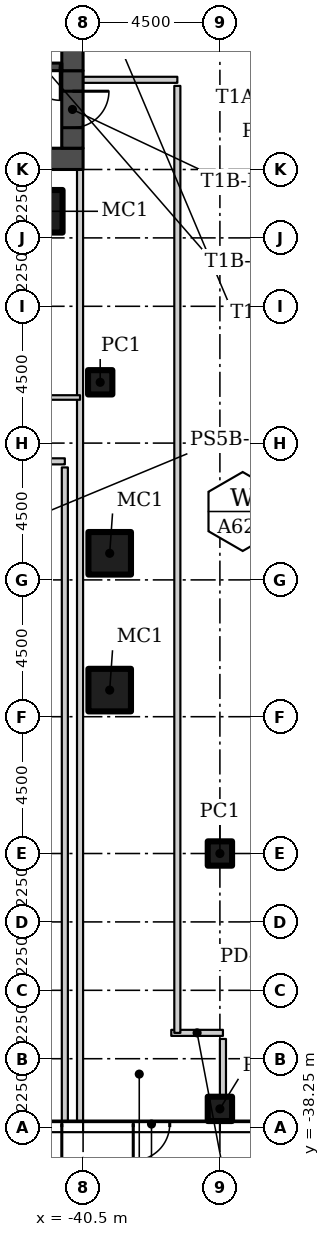
"""IFC4 building model, lengths in metres.
Left out: names, types, materials, properties, quantities, classifications, styles, units other than length and angle.
Written with IfcOpenShell. Run it as: python <this file> out.ifc"""

import sys

from ifc_helpers import new_model, si_unit, direction, frame, frame_2d, origin, origin_2d, place, context, subcontext, project, spatial, rectangle, hollow_rectangle, extrude, element, fill, save


model = new_model("IFC4")
c1 = context("Model", 3, precision=1e-05, world=origin(), true_north=direction((0.0, 1.0)))
c2 = subcontext(c1, "Body", "Model", "MODEL_VIEW")
j1 = project(units=[si_unit("LENGTHUNIT", "METRE"), si_unit("PLANEANGLEUNIT", "RADIAN")], contexts=[c1])
p1 = place(None, origin())
s1 = spatial("IfcSite", under=j1, at=p1, CompositionType="ELEMENT")
p2 = place(p1, origin())
s2 = spatial("IfcBuilding", under=s1, at=p2, CompositionType="ELEMENT")
p3 = place(p2, origin())
s3 = spatial("IfcBuildingStorey", under=s2, at=p3, CompositionType="ELEMENT", Elevation=0.0)
p4 = place(p3, frame((-41.875, -8.125, 0.0)))
e1 = element("IfcColumn", 1, at=p4, inside=s3, PredefinedType="COLUMN", context=c2, shape_type="SweptSolid", body=[
    extrude(hollow_rectangle(XDim=1.4, YDim=1.4, WallThickness=0.06, at=origin_2d()), origin(), (0.0, 0.0, 1.0), 6.1),
])
p5 = place(p3, frame((-39.938, -13.75, 0.0)))
e2 = element("IfcColumn", 2, at=p5, inside=s3, PredefinedType="COLUMN", context=c2, shape_type="SweptSolid", body=[
    extrude(hollow_rectangle(XDim=0.8, YDim=0.8, WallThickness=0.03, at=origin_2d()), origin(), (0.0, 0.0, 1.0), 6.1),
])
for number, where in (
    (3, (-39.625, -19.375, 0.0)),
    (4, (-39.625, -23.875, 0.0)),
):
    element("IfcColumn", number, at=place(p3, frame(where)), inside=s3, PredefinedType="COLUMN", context=c2, shape_type="SweptSolid", body=[
        extrude(hollow_rectangle(XDim=1.4, YDim=1.4, WallThickness=0.06, at=origin_2d()), origin(), (0.0, 0.0, 1.0), 6.1),
    ])
for number, where in (
    (5, (-36.0, -37.65, 0.0)),
    (6, (-36.0, -29.25, 0.0)),
):
    element("IfcColumn", number, at=place(p3, frame(where)), inside=s3, PredefinedType="COLUMN", context=c2, shape_type="SweptSolid", body=[
        extrude(hollow_rectangle(XDim=0.8, YDim=0.8, WallThickness=0.03, at=origin_2d()), origin(), (0.0, 0.0, 1.0), 6.1),
    ])
p6 = place(p3, frame((-35.9, -35.15, 0.0), z_axis=(0.0, 0.0, 1.0), x_axis=(-1.0, 0.0, 0.0)))
e7 = element("IfcWall", 7, at=p6, inside=s3, PredefinedType="PARTITIONING", context=c2, shape_type="SweptSolid", body=[
    extrude(rectangle(XDim=1.7, YDim=0.2, at=frame_2d((0.85, 0.0))), origin(), (0.0, 0.0, 1.0), 6.1),
])
p7 = place(p3, frame((-37.4, -3.8, 0.0), z_axis=(0.0, 0.0, 1.0), x_axis=(-1.0, 0.0, 0.0)))
e8 = element("IfcWall", 8, at=p7, inside=s3, PredefinedType="PARTITIONING", context=c2, shape_type="SweptSolid", body=[
    extrude(rectangle(XDim=3.1, YDim=0.2, at=frame_2d((1.55, 0.0))), origin(), (0.0, 0.0, 1.0), 6.1),
])
p8 = place(p3, frame((-37.4, -35.15, 0.0), z_axis=(0.0, 0.0, 1.0), x_axis=(0.0, 1.0, 0.0)))
e9 = element("IfcWall", 9, at=p8, inside=s3, PredefinedType="PARTITIONING", context=c2, shape_type="SweptSolid", body=[
    extrude(rectangle(XDim=31.149, YDim=0.2, at=frame_2d((15.575, 0.0))), origin(), (0.0, 0.0, 1.0), 6.1),
])
p9 = place(p3, frame((-35.9, -38.155, 0.0), z_axis=(0.0, 0.0, 1.0), x_axis=(0.0, 1.0, 0.0)))
e10 = element("IfcWall", 10, at=p9, inside=s3, PredefinedType="PARTITIONING", context=c2, shape_type="SweptSolid", body=[
    extrude(rectangle(XDim=2.805, YDim=0.2, at=frame_2d((1.402, 0.0))), origin(), (0.0, 0.0, 1.0), 6.1),
])
p10 = place(p3, frame((-40.6, -6.75, 0.0), z_axis=(0.0, 0.0, 1.0), x_axis=(0.0, -1.0, 0.0)))
e11 = element("IfcWall", 11, at=p10, inside=s3, PredefinedType="PARTITIONING", context=c2, shape_type="SweptSolid", body=[
    extrude(rectangle(XDim=31.405, YDim=0.2, at=frame_2d((15.703, 0.0))), origin(), (0.0, 0.0, 1.0), 6.1),
])
p11 = place(p3, frame((-41.1, -38.155, 0.0), z_axis=(0.0, 0.0, 1.0), x_axis=(0.0, 1.0, 0.0)))
e12 = element("IfcWall", 12, at=p11, inside=s3, PredefinedType="PARTITIONING", context=c2, shape_type="SweptSolid", body=[
    extrude(rectangle(XDim=21.605, YDim=0.2, at=frame_2d((10.802, 0.0))), origin(), (0.0, 0.0, 1.0), 6.1),
])
p12 = place(p3, frame((-41.1, -16.35, 0.0), z_axis=(0.0, 0.0, 1.0), x_axis=(-1.0, 0.0, 0.0)))
e13 = element("IfcWall", 13, at=p12, inside=s3, PredefinedType="PARTITIONING", context=c2, shape_type="SweptSolid", body=[
    extrude(rectangle(XDim=3.5, YDim=0.2, at=frame_2d((1.75, 0.0))), origin(), (0.0, 0.0, 1.0), 6.1),
])
p13 = place(p3, frame((-40.6, -14.25, 0.0), z_axis=(0.0, 0.0, 1.0), x_axis=(-1.0, 0.0, 0.0)))
e14 = element("IfcWall", 14, at=p13, inside=s3, PredefinedType="PARTITIONING", context=c2, shape_type="SweptSolid", body=[
    extrude(rectangle(XDim=13.325, YDim=0.15, at=frame_2d((6.663, 0.0))), origin(), (0.0, 0.0, 1.0), 6.1),
])
p14 = place(p3, frame((-35.993, -38.15, 0.0), z_axis=(0.0, 0.0, 1.0), x_axis=(-1.0, 0.0, 0.0)))
e15 = element("IfcWall", 15, at=p14, inside=s3, PredefinedType="SOLIDWALL", context=c2, shape_type="SweptSolid", body=[
    extrude(rectangle(XDim=4.514, YDim=0.2, at=frame_2d((2.257, 0.0))), origin(), (0.0, 0.0, 1.0), 3.0),
])
p15 = place(p14, frame((1.657, 0.0, 0.0)))
e16 = element("IfcOpeningElement", 16, at=p15, cuts=e15, PredefinedType="OPENING", context=c2, shape_type="SweptSolid", body=[
    extrude(rectangle(XDim=1.2, YDim=2.4, at=frame_2d((0.6, 1.2))), frame((0.0, 0.11, 0.0), z_axis=(0.0, -1.0, 0.0), x_axis=(1.0, 0.0, 0.0)), (0.0, 0.0, 1.0), 0.22),
])
p16 = place(p3, frame((-31.533, -38.15, 0.0), z_axis=(0.0, 0.0, 1.0), x_axis=(-1.0, 0.0, 0.0)))
e17 = element("IfcWall", 17, at=p16, inside=s3, PredefinedType="SOLIDWALL", context=c2, shape_type="SweptSolid", body=[
    extrude(rectangle(XDim=4.434, YDim=0.2, at=frame_2d((2.217, 0.0))), origin(), (0.0, 0.0, 1.0), 3.0),
])
p17 = place(p16, frame((1.217, 0.0, 0.0)))
e18 = element("IfcOpeningElement", 18, at=p17, cuts=e17, PredefinedType="OPENING", context=c2, shape_type="SweptSolid", body=[
    extrude(rectangle(XDim=2.0, YDim=2.4, at=frame_2d((1.0, 1.2))), frame((0.0, 0.11, 0.0), z_axis=(0.0, -1.0, 0.0), x_axis=(1.0, 0.0, 0.0)), (0.0, 0.0, 1.0), 0.22),
])
p18 = place(p3, frame((-40.533, -38.15, 0.0), z_axis=(0.0, 0.0, 1.0), x_axis=(-1.0, 0.0, 0.0)))
e19 = element("IfcWall", 19, at=p18, inside=s3, PredefinedType="SOLIDWALL", context=c2, shape_type="SweptSolid", body=[
    extrude(rectangle(XDim=4.427, YDim=0.2, at=frame_2d((2.213, 0.0))), origin(), (0.0, 0.0, 1.0), 3.0),
])
p19 = place(p18, frame((0.667, 0.0, 0.0)))
e20 = element("IfcOpeningElement", 20, at=p19, cuts=e19, PredefinedType="OPENING", context=c2, shape_type="SweptSolid", body=[
    extrude(rectangle(XDim=3.3, YDim=2.4, at=frame_2d((1.65, 1.2))), frame((0.0, 0.11, 0.0), z_axis=(0.0, -1.0, 0.0), x_axis=(1.0, 0.0, 0.0)), (0.0, 0.0, 1.0), 0.22),
])
p20 = place(p3, frame((-40.5, -6.4, 0.0), z_axis=(0.0, 0.0, 1.0), x_axis=(-1.0, 0.0, 0.0)))
e21 = element("IfcWall", 21, at=p20, inside=s3, PredefinedType="SHEAR", context=c2, shape_type="SweptSolid", body=[
    extrude(rectangle(XDim=13.5, YDim=0.7, at=frame_2d((6.75, 0.0))), origin(), (0.0, 0.0, 1.0), 6.1),
])
p21 = place(p3, frame((-40.85, -3.5, 0.0), z_axis=(0.0, 0.0, 1.0), x_axis=(0.0, -1.0, 0.0)))
e22 = element("IfcWall", 22, at=p21, inside=s3, PredefinedType="SHEAR", context=c2, shape_type="SweptSolid", body=[
    extrude(rectangle(XDim=2.55, YDim=0.7, at=frame_2d((1.275, 0.0))), origin(), (0.0, 0.0, 1.0), 6.1),
])
p22 = place(p21, frame((0.675, 0.0, 0.0)))
e23 = element("IfcOpeningElement", 23, at=p22, cuts=e22, PredefinedType="OPENING", context=c2, shape_type="SweptSolid", body=[
    extrude(rectangle(XDim=1.2, YDim=2.4, at=frame_2d((0.6, 1.2))), frame((0.0, 0.36, 0.0), z_axis=(0.0, -1.0, 0.0), x_axis=(1.0, 0.0, 0.0)), (0.0, 0.0, 1.0), 0.72),
])
p23 = place(p3, frame((-40.85, -3.5, 0.0), z_axis=(0.0, 0.0, 1.0), x_axis=(0.0, 1.0, 0.0)))
e24 = element("IfcWall", 24, at=p23, inside=s3, PredefinedType="SHEAR", context=c2, shape_type="SweptSolid", body=[
    extrude(rectangle(XDim=7.0, YDim=0.7, at=frame_2d((3.5, 0.0))), origin(), (0.0, 0.0, 1.0), 6.1),
])
p24 = place(p23, frame((0.9, 0.0, 0.0)))
e25 = element("IfcOpeningElement", 25, at=p24, cuts=e24, PredefinedType="OPENING", context=c2, shape_type="SweptSolid", body=[
    extrude(rectangle(XDim=1.2, YDim=2.1, at=frame_2d((0.6, 1.05))), frame((0.0, 0.36, 0.0), z_axis=(0.0, -1.0, 0.0), x_axis=(1.0, 0.0, 0.0)), (0.0, 0.0, 1.0), 0.72),
])
p25 = place(p23, frame((3.85, 0.0, 0.0)))
e26 = element("IfcOpeningElement", 26, at=p25, cuts=e24, PredefinedType="OPENING", context=c2, shape_type="SweptSolid", body=[
    extrude(rectangle(XDim=1.8, YDim=2.4, at=frame_2d((0.9, 1.2))), frame((0.0, 0.36, 0.0), z_axis=(0.0, -1.0, 0.0), x_axis=(1.0, 0.0, 0.0)), (0.0, 0.0, 1.0), 0.72),
])
p26 = place(p3, frame((-41.2, -3.375, 0.0), z_axis=(0.0, 0.0, 1.0), x_axis=(-1.0, 0.0, 0.0)))
e27 = element("IfcWall", 27, at=p26, inside=s3, PredefinedType="SHEAR", context=c2, shape_type="SweptSolid", body=[
    extrude(rectangle(XDim=12.1, YDim=0.25, at=frame_2d((6.05, 0.0))), origin(), (0.0, 0.0, 1.0), 6.1),
])
p27 = place(p26, frame((0.05, 0.0, 0.0)))
e28 = element("IfcOpeningElement", 28, at=p27, cuts=e27, PredefinedType="OPENING", context=c2, shape_type="SweptSolid", body=[
    extrude(rectangle(XDim=1.1, YDim=2.1, at=frame_2d((0.55, 1.05))), frame((0.0, 0.135, 0.0), z_axis=(0.0, -1.0, 0.0), x_axis=(1.0, 0.0, 0.0)), (0.0, 0.0, 1.0), 0.27),
])
p28 = place(p15, origin())
e29 = element("IfcDoor", 29, at=p28, inside=s3, OperationType="SINGLE_SWING_RIGHT", PredefinedType="DOOR", context=c2, shape_type="SweptSolid", body=[
    extrude(rectangle(XDim=1.2, YDim=2.4, at=frame_2d((0.6, 1.2))), frame((0.0, 0.025, 0.0), z_axis=(0.0, -1.0, 0.0), x_axis=(1.0, 0.0, 0.0)), (0.0, 0.0, 1.0), 0.05),
])
fill(e16, e29)
p29 = place(p19, origin())
e30 = element("IfcDoor", 30, at=p29, inside=s3, OperationType="DOUBLE_DOOR_SINGLE_SWING", PredefinedType="DOOR", context=c2, shape_type="SweptSolid", body=[
    extrude(rectangle(XDim=3.3, YDim=2.4, at=frame_2d((1.65, 1.2))), frame((0.0, 0.025, 0.0), z_axis=(0.0, -1.0, 0.0), x_axis=(1.0, 0.0, 0.0)), (0.0, 0.0, 1.0), 0.05),
])
fill(e20, e30)
p30 = place(p22, origin())
e31 = element("IfcDoor", 31, at=p30, inside=s3, OperationType="SINGLE_SWING_RIGHT", PredefinedType="DOOR", context=c2, shape_type="SweptSolid", body=[
    extrude(rectangle(XDim=1.2, YDim=2.4, at=frame_2d((0.6, 1.2))), frame((0.0, 0.025, 0.0), z_axis=(0.0, -1.0, 0.0), x_axis=(1.0, 0.0, 0.0)), (0.0, 0.0, 1.0), 0.05),
])
fill(e23, e31)
p31 = place(p27, origin())
e32 = element("IfcDoor", 32, at=p31, inside=s3, OperationType="SINGLE_SWING_LEFT", PredefinedType="DOOR", context=c2, shape_type="SweptSolid", body=[
    extrude(rectangle(XDim=1.1, YDim=2.1, at=frame_2d((0.55, 1.05))), frame((0.0, 0.025, 0.0), z_axis=(0.0, -1.0, 0.0), x_axis=(1.0, 0.0, 0.0)), (0.0, 0.0, 1.0), 0.05),
])
fill(e28, e32)
save(model, sys.argv[1])
